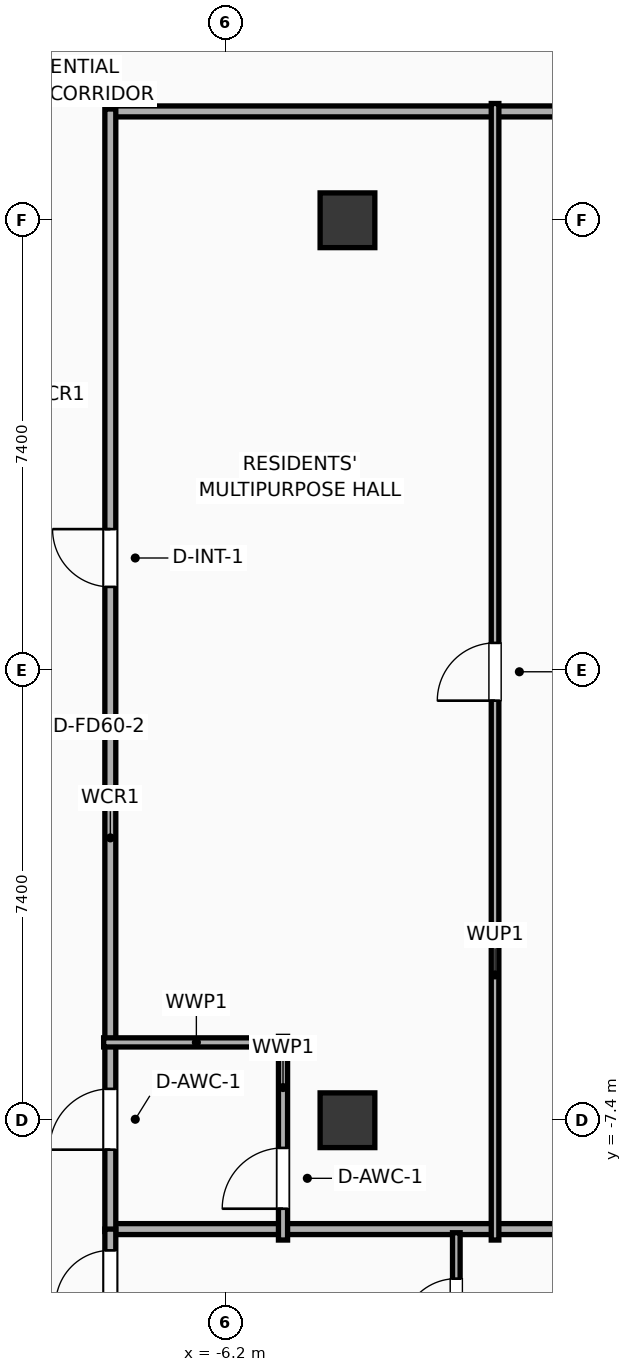
"""IFC4 building model, lengths in metres.
Left out: names, types, materials, properties, quantities, classifications, styles, units other than length and angle.
Written with IfcOpenShell. Run it as: python <this file> out.ifc"""

import sys

from ifc_helpers import new_model, si_unit, direction, frame, frame_2d, origin, origin_2d, place, context, subcontext, project, spatial, rectangle, extrude, element, fill, save


model = new_model("IFC4")
c1 = context("Model", 3, precision=1e-05, world=origin(), true_north=direction((0.0, 1.0)))
c2 = subcontext(c1, "Body", "Model", "MODEL_VIEW")
j1 = project(units=[si_unit("LENGTHUNIT", "METRE"), si_unit("PLANEANGLEUNIT", "RADIAN")], contexts=[c1])
p1 = place(None, origin())
s1 = spatial("IfcSite", under=j1, at=p1, CompositionType="ELEMENT")
p2 = place(p1, origin())
s2 = spatial("IfcBuilding", under=s1, at=p2, CompositionType="ELEMENT")
p3 = place(p2, frame((0.0, 0.0, 223.6)))
s3 = spatial("IfcBuildingStorey", under=s2, at=p3, CompositionType="ELEMENT", Elevation=223.6)
for number, where, z_axis, x_axis in (
    (1, (-4.2, -7.4, 0.0), (0.0, 0.0, 1.0), (1.0, 0.0, 0.0)),
    (2, (-4.2, 7.4, 0.0), (0.0, 0.0, 1.0), (1.0, 0.0, 0.0)),
):
    element("IfcColumn", number, at=place(p3, frame(where, z_axis=z_axis, x_axis=x_axis)), inside=s3, PredefinedType="COLUMN", context=c2, shape_type="SweptSolid", body=[
        extrude(rectangle(XDim=0.9, YDim=0.9, at=origin_2d()), origin(), (0.0, 0.0, 1.0), 3.9),
    ])
p4 = place(p3, frame((-8.15, 9.19, 0.0), z_axis=(0.0, 0.0, 1.0), x_axis=(1.0, 0.0, 0.0)))
e3 = element("IfcWall", 3, at=p4, inside=s3, PredefinedType="PARTITIONING", context=c2, shape_type="SweptSolid", body=[
    extrude(rectangle(XDim=16.3, YDim=0.18, at=frame_2d((8.15, 0.0))), origin(), (0.0, 0.0, 1.0), 3.65),
])
p5 = place(p4, frame((8.49, 0.0, 0.0)))
e4 = element("IfcOpeningElement", 4, at=p5, cuts=e3, PredefinedType="OPENING", context=c2, shape_type="SweptSolid", body=[
    extrude(rectangle(XDim=0.95, YDim=2.05, at=frame_2d((0.475, 1.025))), frame((0.0, 0.1, 0.0), z_axis=(0.0, -1.0, 0.0), x_axis=(1.0, 0.0, 0.0)), (0.0, 0.0, 1.0), 0.2),
])
p6 = place(p3, frame((-8.15, -9.19, 0.0), z_axis=(0.0, 0.0, 1.0), x_axis=(1.0, 0.0, 0.0)))
e5 = element("IfcWall", 5, at=p6, inside=s3, PredefinedType="PARTITIONING", context=c2, shape_type="SweptSolid", body=[
    extrude(rectangle(XDim=16.3, YDim=0.18, at=frame_2d((8.15, 0.0))), origin(), (0.0, 0.0, 1.0), 3.65),
])
p7 = place(p3, frame((-8.1, -9.23, 0.0), z_axis=(0.0, 0.0, 1.0), x_axis=(0.0, 1.0, 0.0)))
e6 = element("IfcWall", 6, at=p7, inside=s3, PredefinedType="PARTITIONING", context=c2, shape_type="SweptSolid", body=[
    extrude(rectangle(XDim=18.46, YDim=0.18, at=frame_2d((9.23, 0.0))), origin(), (0.0, 0.0, 1.0), 3.65),
])
p8 = place(p7, frame((1.346, 0.0, 0.0)))
e7 = element("IfcOpeningElement", 7, at=p8, cuts=e6, PredefinedType="OPENING", context=c2, shape_type="SweptSolid", body=[
    extrude(rectangle(XDim=1.0, YDim=2.05, at=frame_2d((0.5, 1.025))), frame((0.0, 0.1, 0.0), z_axis=(0.0, -1.0, 0.0), x_axis=(1.0, 0.0, 0.0)), (0.0, 0.0, 1.0), 0.2),
])
p9 = place(p7, frame((10.601, 0.0, 0.0)))
e8 = element("IfcOpeningElement", 8, at=p9, cuts=e6, PredefinedType="OPENING", context=c2, shape_type="SweptSolid", body=[
    extrude(rectangle(XDim=0.95, YDim=2.05, at=frame_2d((0.475, 1.025))), frame((0.0, 0.1, 0.0), z_axis=(0.0, -1.0, 0.0), x_axis=(1.0, 0.0, 0.0)), (0.0, 0.0, 1.0), 0.2),
])
p10 = place(p3, frame((-5.26, -9.37, 0.0), z_axis=(0.0, 0.0, 1.0), x_axis=(0.0, 1.0, 0.0)))
e9 = element("IfcWall", 9, at=p10, inside=s3, PredefinedType="PLUMBINGWALL", context=c2, shape_type="SweptSolid", body=[
    extrude(rectangle(XDim=3.35, YDim=0.15, at=frame_2d((1.675, 0.0))), origin(), (0.0, 0.0, 1.0), 3.65),
])
p11 = place(p10, frame((0.515, 0.0, 0.0)))
e10 = element("IfcOpeningElement", 10, at=p11, cuts=e9, PredefinedType="OPENING", context=c2, shape_type="SweptSolid", body=[
    extrude(rectangle(XDim=1.0, YDim=2.05, at=frame_2d((0.5, 1.025))), frame((0.0, 0.085, 0.0), z_axis=(0.0, -1.0, 0.0), x_axis=(1.0, 0.0, 0.0)), (0.0, 0.0, 1.0), 0.17),
])
p12 = place(p3, frame((-8.21, -6.12, 0.0), z_axis=(0.0, 0.0, 1.0), x_axis=(1.0, 0.0, 0.0)))
e11 = element("IfcWall", 11, at=p12, inside=s3, PredefinedType="PLUMBINGWALL", context=c2, shape_type="SweptSolid", body=[
    extrude(rectangle(XDim=3.05, YDim=0.15, at=frame_2d((1.525, 0.0))), origin(), (0.0, 0.0, 1.0), 3.65),
])
p13 = place(p3, frame((-1.773, -9.37, 0.0), z_axis=(0.0, 0.0, 1.0), x_axis=(0.0, 1.0, 0.0)))
e12 = element("IfcWall", 12, at=p13, inside=s3, PredefinedType="PARTITIONING", context=c2, shape_type="SweptSolid", body=[
    extrude(rectangle(XDim=18.69, YDim=0.125, at=frame_2d((9.345, 0.0))), origin(), (0.0, 0.0, 1.0), 3.65),
])
p14 = place(p13, frame((8.87, 0.0, 0.0)))
e13 = element("IfcOpeningElement", 13, at=p14, cuts=e12, PredefinedType="OPENING", context=c2, shape_type="SweptSolid", body=[
    extrude(rectangle(XDim=0.95, YDim=2.05, at=frame_2d((0.475, 1.025))), frame((0.0, 0.073, 0.0), z_axis=(0.0, -1.0, 0.0), x_axis=(1.0, 0.0, 0.0)), (0.0, 0.0, 1.0), 0.145),
])
p15 = place(p3, frame((-2.41, -11.66, 0.0), z_axis=(0.0, 0.0, 1.0), x_axis=(0.0, 1.0, 0.0)))
e14 = element("IfcWall", 14, at=p15, inside=s3, PredefinedType="PARTITIONING", context=c2, shape_type="SweptSolid", body=[
    extrude(rectangle(XDim=2.41, YDim=0.125, at=frame_2d((1.205, 0.0))), origin(), (0.0, 0.0, 1.0), 3.65),
])
p16 = place(p15, frame((0.755, 0.0, 0.0)))
e15 = element("IfcOpeningElement", 15, at=p16, cuts=e14, PredefinedType="OPENING", context=c2, shape_type="SweptSolid", body=[
    extrude(rectangle(XDim=0.9, YDim=2.05, at=frame_2d((0.45, 1.025))), frame((0.0, 0.073, 0.0), z_axis=(0.0, -1.0, 0.0), x_axis=(1.0, 0.0, 0.0)), (0.0, 0.0, 1.0), 0.145),
])
p17 = place(p3, frame((-8.1, -18.83, 0.0), z_axis=(0.0, 0.0, 1.0), x_axis=(0.0, 1.0, 0.0)))
e16 = element("IfcWall", 16, at=p17, inside=s3, PredefinedType="PARTITIONING", context=c2, shape_type="SweptSolid", body=[
    extrude(rectangle(XDim=9.64, YDim=0.18, at=frame_2d((4.82, 0.0))), origin(), (0.0, 0.0, 1.0), 3.65),
])
p18 = place(p17, frame((8.39, 0.0, 0.0)))
e17 = element("IfcOpeningElement", 17, at=p18, cuts=e16, PredefinedType="OPENING", context=c2, shape_type="SweptSolid", body=[
    extrude(rectangle(XDim=0.9, YDim=2.05, at=frame_2d((0.45, 1.025))), frame((0.0, 0.1, 0.0), z_axis=(0.0, -1.0, 0.0), x_axis=(1.0, 0.0, 0.0)), (0.0, 0.0, 1.0), 0.2),
])
p19 = place(p8, origin())
e18 = element("IfcDoor", 18, at=p19, inside=s3, OperationType="SINGLE_SWING_LEFT", PredefinedType="DOOR", context=c2, shape_type="SweptSolid", body=[
    extrude(rectangle(XDim=1.0, YDim=2.05, at=frame_2d((0.5, 1.025))), frame((0.0, 0.025, 0.0), z_axis=(0.0, -1.0, 0.0), x_axis=(1.0, 0.0, 0.0)), (0.0, 0.0, 1.0), 0.05),
])
fill(e7, e18)
p20 = place(p9, origin())
e19 = element("IfcDoor", 19, at=p20, inside=s3, OperationType="SINGLE_SWING_RIGHT", PredefinedType="DOOR", context=c2, shape_type="SweptSolid", body=[
    extrude(rectangle(XDim=0.95, YDim=2.05, at=frame_2d((0.475, 1.025))), frame((0.0, 0.025, 0.0), z_axis=(0.0, -1.0, 0.0), x_axis=(1.0, 0.0, 0.0)), (0.0, 0.0, 1.0), 0.05),
])
fill(e8, e19)
p21 = place(p11, origin())
e20 = element("IfcDoor", 20, at=p21, inside=s3, OperationType="SINGLE_SWING_LEFT", PredefinedType="DOOR", context=c2, shape_type="SweptSolid", body=[
    extrude(rectangle(XDim=1.0, YDim=2.05, at=frame_2d((0.5, 1.025))), frame((0.0, 0.025, 0.0), z_axis=(0.0, -1.0, 0.0), x_axis=(1.0, 0.0, 0.0)), (0.0, 0.0, 1.0), 0.05),
])
fill(e10, e20)
p22 = place(p14, origin())
e21 = element("IfcDoor", 21, at=p22, inside=s3, OperationType="SINGLE_SWING_LEFT", PredefinedType="DOOR", context=c2, shape_type="SweptSolid", body=[
    extrude(rectangle(XDim=0.95, YDim=2.05, at=frame_2d((0.475, 1.025))), frame((0.0, 0.025, 0.0), z_axis=(0.0, -1.0, 0.0), x_axis=(1.0, 0.0, 0.0)), (0.0, 0.0, 1.0), 0.05),
])
fill(e13, e21)
p23 = place(p16, origin())
e22 = element("IfcDoor", 22, at=p23, inside=s3, OperationType="SINGLE_SWING_LEFT", PredefinedType="DOOR", context=c2, shape_type="SweptSolid", body=[
    extrude(rectangle(XDim=0.9, YDim=2.05, at=frame_2d((0.45, 1.025))), frame((0.0, 0.025, 0.0), z_axis=(0.0, -1.0, 0.0), x_axis=(1.0, 0.0, 0.0)), (0.0, 0.0, 1.0), 0.05),
])
fill(e15, e22)
p24 = place(p18, origin())
e23 = element("IfcDoor", 23, at=p24, inside=s3, OperationType="SINGLE_SWING_LEFT", PredefinedType="DOOR", context=c2, shape_type="SweptSolid", body=[
    extrude(rectangle(XDim=0.9, YDim=2.05, at=frame_2d((0.45, 1.025))), frame((0.0, 0.025, 0.0), z_axis=(0.0, -1.0, 0.0), x_axis=(1.0, 0.0, 0.0)), (0.0, 0.0, 1.0), 0.05),
])
fill(e17, e23)
save(model, sys.argv[1])
